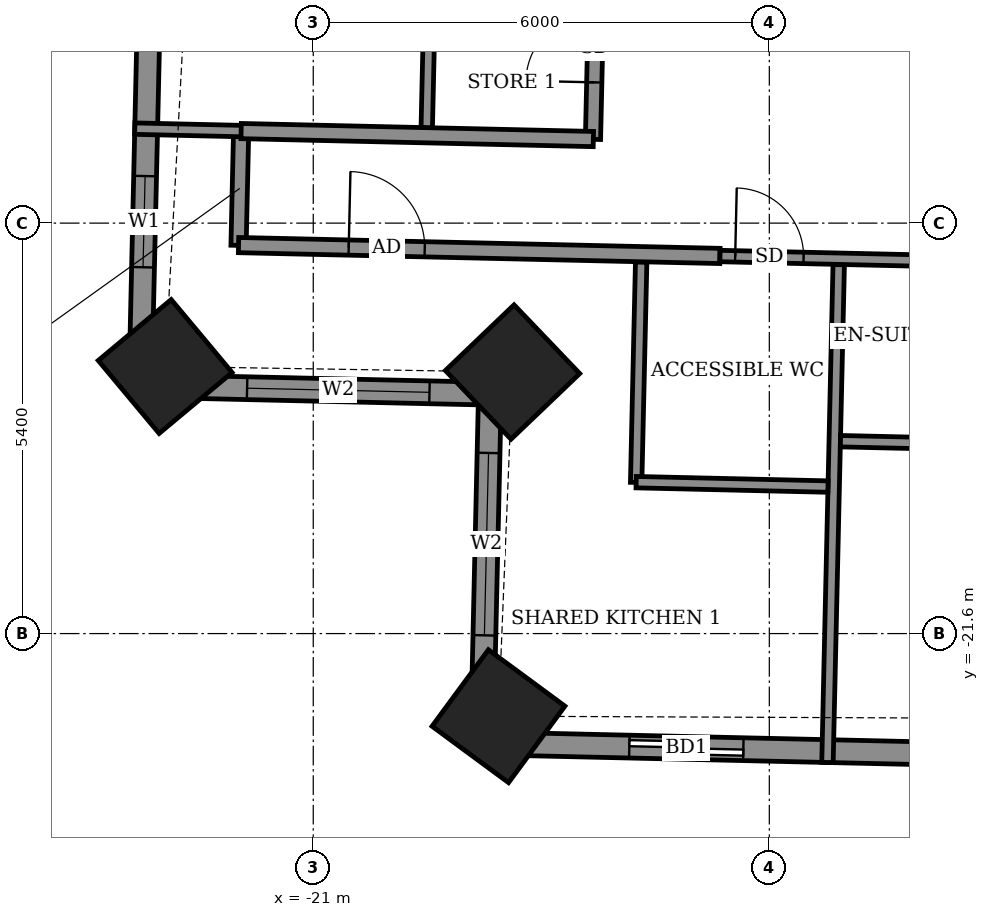
"""IFC4 building model, lengths in metres.
Left out: names, types, materials, properties, quantities, classifications, styles, units other than length and angle.
Written with IfcOpenShell. Run it as: python <this file> out.ifc"""

import sys

from ifc_helpers import new_model, si_unit, direction, frame, frame_2d, origin, origin_2d, place, context, subcontext, project, spatial, rectangle, extrude, element, fill, save


model = new_model("IFC4")
c1 = context("Model", 3, precision=1e-05, world=origin(), true_north=direction((0.0, 1.0)))
c2 = subcontext(c1, "Body", "Model", "MODEL_VIEW")
j1 = project(units=[si_unit("LENGTHUNIT", "METRE"), si_unit("PLANEANGLEUNIT", "RADIAN")], contexts=[c1])
p1 = place(None, origin())
s1 = spatial("IfcSite", under=j1, at=p1, CompositionType="ELEMENT")
p2 = place(p1, origin())
s2 = spatial("IfcBuilding", under=s1, at=p2, CompositionType="ELEMENT")
p3 = place(p2, frame((0.0, 0.0, 156.3)))
s3 = spatial("IfcBuildingStorey", under=s2, at=p3, CompositionType="ELEMENT", Elevation=156.3)
for number, where, z_axis, x_axis in (
    (1, (-22.948, -18.086, -0.55), (0.0, 0.0, 1.0), (0.641, -0.768, 0.0)),
    (2, (-18.378, -18.159, -0.55), (0.0, 0.0, 1.0), (0.691, -0.723, 0.0)),
    (3, (-18.563, -22.687, -0.55), (0.0, 0.0, 1.0), (0.805, -0.593, 0.0)),
):
    element("IfcColumn", number, at=place(p3, frame(where, z_axis=z_axis, x_axis=x_axis)), inside=s3, PredefinedType="COLUMN", context=c2, shape_type="SweptSolid", body=[
        extrude(rectangle(XDim=1.25, YDim=1.25, at=origin_2d()), origin(), (0.0, 0.0, 1.0), 3.6),
    ])
p4 = place(p3, frame((-23.038, -7.913, 0.0), z_axis=(0.0, 0.0, 1.0), x_axis=(-0.022705985163, -0.999742185885, 0.0)))
e4 = element("IfcWall", 4, at=p4, inside=s3, PredefinedType="SOLIDWALL", context=c2, shape_type="SweptSolid", body=[
    extrude(rectangle(XDim=10.43, YDim=0.3, at=frame_2d((5.215, 0.0))), origin(), (0.0, 0.0, 1.0), 3.05),
])
p5 = place(p4, frame((1.936, 0.0, 0.0)))
e5 = element("IfcOpeningElement", 5, at=p5, cuts=e4, PredefinedType="OPENING", context=c2, shape_type="SweptSolid", body=[
    extrude(rectangle(XDim=1.5, YDim=2.4, at=frame_2d((0.75, 1.2))), frame((0.0, 0.16, 0.0), z_axis=(0.0, -1.0, 0.0), x_axis=(1.0, 0.0, 0.0)), (0.0, 0.0, 1.0), 0.32),
])
p6 = place(p4, frame((7.67, 0.0, 0.9)))
e6 = element("IfcOpeningElement", 6, at=p6, cuts=e4, PredefinedType="OPENING", context=c2, shape_type="SweptSolid", body=[
    extrude(rectangle(XDim=1.2, YDim=1.5, at=frame_2d((0.6, 0.75))), frame((0.0, 0.16, 0.0), z_axis=(0.0, -1.0, 0.0), x_axis=(1.0, 0.0, 0.0)), (0.0, 0.0, 1.0), 0.32),
])
p7 = place(p3, frame((-23.275, -18.34, 0.0), z_axis=(0.0, 0.0, 1.0), x_axis=(0.999744377441, -0.022609285172, 0.0)))
e7 = element("IfcWall", 7, at=p7, inside=s3, PredefinedType="SOLIDWALL", context=c2, shape_type="SweptSolid", body=[
    extrude(rectangle(XDim=4.6, YDim=0.3, at=frame_2d((2.3, 0.0))), origin(), (0.0, 0.0, 1.0), 2.55),
])
p8 = place(p7, frame((1.405, 0.0, 0.9)))
e8 = element("IfcOpeningElement", 8, at=p8, cuts=e7, PredefinedType="OPENING", context=c2, shape_type="SweptSolid", body=[
    extrude(rectangle(XDim=2.4, YDim=1.5, at=frame_2d((1.2, 0.75))), frame((0.0, 0.16, 0.0), z_axis=(0.0, -1.0, 0.0), x_axis=(1.0, 0.0, 0.0)), (0.0, 0.0, 1.0), 0.32),
])
p9 = place(p3, frame((-18.676, -18.444, 0.0), z_axis=(0.0, 0.0, 1.0), x_axis=(-0.022821468877, -0.999739556364, 0.0)))
e9 = element("IfcWall", 9, at=p9, inside=s3, PredefinedType="SOLIDWALL", context=c2, shape_type="SweptSolid", body=[
    extrude(rectangle(XDim=4.6, YDim=0.3, at=frame_2d((2.3, 0.0))), origin(), (0.0, 0.0, 1.0), 2.55),
])
p10 = place(p9, frame((0.78, 0.0, 0.9)))
e10 = element("IfcOpeningElement", 10, at=p10, cuts=e9, PredefinedType="OPENING", context=c2, shape_type="SweptSolid", body=[
    extrude(rectangle(XDim=2.4, YDim=1.5, at=frame_2d((1.2, 0.75))), frame((0.0, 0.16, 0.0), z_axis=(0.0, -1.0, 0.0), x_axis=(1.0, 0.0, 0.0)), (0.0, 0.0, 1.0), 0.32),
])
p11 = place(p3, frame((-18.781, -23.043, 0.0), z_axis=(0.0, 0.0, 1.0), x_axis=(0.999742794992, -0.022679150367, 0.0)))
e11 = element("IfcWall", 11, at=p11, inside=s3, PredefinedType="SOLIDWALL", context=c2, shape_type="SweptSolid", body=[
    extrude(rectangle(XDim=38.98, YDim=0.3, at=frame_2d((19.49, 0.0))), origin(), (0.0, 0.0, 1.0), 3.05),
])
p12 = place(p11, frame((1.94, 0.0, 0.0)))
e12 = element("IfcOpeningElement", 12, at=p12, cuts=e11, PredefinedType="OPENING", context=c2, shape_type="SweptSolid", body=[
    extrude(rectangle(XDim=1.5, YDim=2.4, at=frame_2d((0.75, 1.2))), frame((0.0, 0.16, 0.0), z_axis=(0.0, -1.0, 0.0), x_axis=(1.0, 0.0, 0.0)), (0.0, 0.0, 1.0), 0.32),
])
p13 = place(p11, frame((7.211, 0.0, 0.0)))
e13 = element("IfcOpeningElement", 13, at=p13, cuts=e11, PredefinedType="OPENING", context=c2, shape_type="SweptSolid", body=[
    extrude(rectangle(XDim=1.2, YDim=2.4, at=frame_2d((0.6, 1.2))), frame((0.0, 0.16, 0.0), z_axis=(0.0, -1.0, 0.0), x_axis=(1.0, 0.0, 0.0)), (0.0, 0.0, 1.0), 0.32),
])
p14 = place(p11, frame((9.959, 0.0, 0.0)))
e14 = element("IfcOpeningElement", 14, at=p14, cuts=e11, PredefinedType="OPENING", context=c2, shape_type="SweptSolid", body=[
    extrude(rectangle(XDim=1.5, YDim=2.4, at=frame_2d((0.75, 1.2))), frame((0.0, 0.16, 0.0), z_axis=(0.0, -1.0, 0.0), x_axis=(1.0, 0.0, 0.0)), (0.0, 0.0, 1.0), 0.32),
])
p15 = place(p11, frame((14.659, 0.0, 0.0)))
e15 = element("IfcOpeningElement", 15, at=p15, cuts=e11, PredefinedType="OPENING", context=c2, shape_type="SweptSolid", body=[
    extrude(rectangle(XDim=1.5, YDim=2.4, at=frame_2d((0.75, 1.2))), frame((0.0, 0.16, 0.0), z_axis=(0.0, -1.0, 0.0), x_axis=(1.0, 0.0, 0.0)), (0.0, 0.0, 1.0), 0.32),
])
p16 = place(p11, frame((20.232, 0.0, 0.0)))
e16 = element("IfcOpeningElement", 16, at=p16, cuts=e11, PredefinedType="OPENING", context=c2, shape_type="SweptSolid", body=[
    extrude(rectangle(XDim=1.2, YDim=2.4, at=frame_2d((0.6, 1.2))), frame((0.0, 0.16, 0.0), z_axis=(0.0, -1.0, 0.0), x_axis=(1.0, 0.0, 0.0)), (0.0, 0.0, 1.0), 0.32),
])
p17 = place(p11, frame((22.981, 0.0, 0.0)))
e17 = element("IfcOpeningElement", 17, at=p17, cuts=e11, PredefinedType="OPENING", context=c2, shape_type="SweptSolid", body=[
    extrude(rectangle(XDim=1.5, YDim=2.4, at=frame_2d((0.75, 1.2))), frame((0.0, 0.16, 0.0), z_axis=(0.0, -1.0, 0.0), x_axis=(1.0, 0.0, 0.0)), (0.0, 0.0, 1.0), 0.32),
])
p18 = place(p11, frame((27.681, 0.0, 0.0)))
e18 = element("IfcOpeningElement", 18, at=p18, cuts=e11, PredefinedType="OPENING", context=c2, shape_type="SweptSolid", body=[
    extrude(rectangle(XDim=1.5, YDim=2.4, at=frame_2d((0.75, 1.2))), frame((0.0, 0.16, 0.0), z_axis=(0.0, -1.0, 0.0), x_axis=(1.0, 0.0, 0.0)), (0.0, 0.0, 1.0), 0.32),
])
p19 = place(p11, frame((30.654, 0.0, 0.0)))
e19 = element("IfcOpeningElement", 19, at=p19, cuts=e11, PredefinedType="OPENING", context=c2, shape_type="SweptSolid", body=[
    extrude(rectangle(XDim=1.2, YDim=2.4, at=frame_2d((0.6, 1.2))), frame((0.0, 0.16, 0.0), z_axis=(0.0, -1.0, 0.0), x_axis=(1.0, 0.0, 0.0)), (0.0, 0.0, 1.0), 0.32),
])
p20 = place(p11, frame((35.176, 0.0, 0.9)))
e20 = element("IfcOpeningElement", 20, at=p20, cuts=e11, PredefinedType="OPENING", context=c2, shape_type="SweptSolid", body=[
    extrude(rectangle(XDim=2.4, YDim=1.5, at=frame_2d((1.2, 0.75))), frame((0.0, 0.16, 0.0), z_axis=(0.0, -1.0, 0.0), x_axis=(1.0, 0.0, 0.0)), (0.0, 0.0, 1.0), 0.32),
])
p21 = place(p3, frame((-14.235, -23.296, 0.0), z_axis=(0.0, 0.0, 1.0), x_axis=(0.022623197363, 0.999744062719, 0.0)))
e21 = element("IfcWall", 21, at=p21, inside=s3, PredefinedType="PARTITIONING", context=c2, shape_type="SweptSolid", body=[
    extrude(rectangle(XDim=6.551, YDim=0.15, at=frame_2d((3.275, 0.0))), origin(), (0.0, 0.0, 1.0), 2.55),
])
p22 = place(p3, frame((-16.752, -19.612, 0.0), z_axis=(0.0, 0.0, 1.0), x_axis=(0.022730967319, 0.999741618182, 0.0)))
e22 = element("IfcWall", 22, at=p22, inside=s3, PredefinedType="PARTITIONING", context=c2, shape_type="SweptSolid", body=[
    extrude(rectangle(XDim=2.9, YDim=0.15, at=frame_2d((1.45, 0.0))), origin(), (0.0, 0.0, 1.0), 3.05),
])
p23 = place(p3, frame((-16.752, -19.608, 0.0), z_axis=(0.0, 0.0, 1.0), x_axis=(0.999735102249, -0.023015762656, 0.0)))
e23 = element("IfcWall", 23, at=p23, inside=s3, PredefinedType="PARTITIONING", context=c2, shape_type="SweptSolid", body=[
    extrude(rectangle(XDim=2.525, YDim=0.15, at=frame_2d((1.262, 0.0))), origin(), (0.0, 0.0, 1.0), 3.05),
])
p24 = place(p3, frame((-14.064, -19.069, 0.0), z_axis=(0.0, 0.0, 1.0), x_axis=(0.999740260747, -0.02279059109, 0.0)))
e24 = element("IfcWall", 24, at=p24, inside=s3, PredefinedType="PARTITIONING", context=c2, shape_type="SweptSolid", body=[
    extrude(rectangle(XDim=2.324, YDim=0.15, at=frame_2d((1.162, 0.0))), origin(), (0.0, 0.0, 1.0), 3.05),
])
p25 = place(p3, frame((-21.983, -16.493, 0.0), z_axis=(0.0, 0.0, 1.0), x_axis=(0.022617910375, 0.999744182344, 0.0)))
e25 = element("IfcWall", 25, at=p25, inside=s3, PredefinedType="PARTITIONING", context=c2, shape_type="SweptSolid", body=[
    extrude(rectangle(XDim=1.5, YDim=0.2, at=frame_2d((0.75, 0.0))), origin(), (0.0, 0.0, 1.0), 3.05),
])
p26 = place(p3, frame((-21.983, -16.489, 0.0), z_axis=(0.0, 0.0, 1.0), x_axis=(0.999744930163, -0.022584831499, 0.0)))
e26 = element("IfcWall", 26, at=p26, inside=s3, PredefinedType="PARTITIONING", context=c2, shape_type="SweptSolid", body=[
    extrude(rectangle(XDim=6.335, YDim=0.2, at=frame_2d((3.167, 0.0))), origin(), (0.0, 0.0, 1.0), 3.05),
])
p27 = place(p26, frame((1.45, 0.0, 0.0)))
e27 = element("IfcOpeningElement", 27, at=p27, cuts=e26, PredefinedType="OPENING", context=c2, shape_type="SweptSolid", body=[
    extrude(rectangle(XDim=1.0, YDim=2.1, at=frame_2d((0.5, 1.05))), frame((0.0, 0.11, 0.0), z_axis=(0.0, -1.0, 0.0), x_axis=(1.0, 0.0, 0.0)), (0.0, 0.0, 1.0), 0.22),
])
p28 = place(p3, frame((-15.649, -16.633, 0.0), z_axis=(0.0, 0.0, 1.0), x_axis=(0.999743261737, -0.022658565952, 0.0)))
e28 = element("IfcWall", 28, at=p28, inside=s3, PredefinedType="PARTITIONING", context=c2, shape_type="SweptSolid", body=[
    extrude(rectangle(XDim=30.536, YDim=0.15, at=frame_2d((15.268, 0.0))), origin(), (0.0, 0.0, 1.0), 3.05),
])
p29 = place(p28, frame((0.2, 0.0, 0.0)))
e29 = element("IfcOpeningElement", 29, at=p29, cuts=e28, PredefinedType="OPENING", context=c2, shape_type="SweptSolid", body=[
    extrude(rectangle(XDim=0.9, YDim=2.1, at=frame_2d((0.45, 1.05))), frame((0.0, 0.085, 0.0), z_axis=(0.0, -1.0, 0.0), x_axis=(1.0, 0.0, 0.0)), (0.0, 0.0, 1.0), 0.17),
])
p30 = place(p28, frame((4.465, 0.0, 0.0)))
e30 = element("IfcOpeningElement", 30, at=p30, cuts=e28, PredefinedType="OPENING", context=c2, shape_type="SweptSolid", body=[
    extrude(rectangle(XDim=0.9, YDim=2.1, at=frame_2d((0.45, 1.05))), frame((0.0, 0.085, 0.0), z_axis=(0.0, -1.0, 0.0), x_axis=(1.0, 0.0, 0.0)), (0.0, 0.0, 1.0), 0.17),
])
p31 = place(p28, frame((6.315, 0.0, 0.0)))
e31 = element("IfcOpeningElement", 31, at=p31, cuts=e28, PredefinedType="OPENING", context=c2, shape_type="SweptSolid", body=[
    extrude(rectangle(XDim=0.9, YDim=2.1, at=frame_2d((0.45, 1.05))), frame((0.0, 0.085, 0.0), z_axis=(0.0, -1.0, 0.0), x_axis=(1.0, 0.0, 0.0)), (0.0, 0.0, 1.0), 0.17),
])
p32 = place(p28, frame((13.04, 0.0, 0.0)))
e32 = element("IfcOpeningElement", 32, at=p32, cuts=e28, PredefinedType="OPENING", context=c2, shape_type="SweptSolid", body=[
    extrude(rectangle(XDim=0.9, YDim=2.1, at=frame_2d((0.45, 1.05))), frame((0.0, 0.085, 0.0), z_axis=(0.0, -1.0, 0.0), x_axis=(1.0, 0.0, 0.0)), (0.0, 0.0, 1.0), 0.17),
])
p33 = place(p28, frame((15.015, 0.0, 0.0)))
e33 = element("IfcOpeningElement", 33, at=p33, cuts=e28, PredefinedType="OPENING", context=c2, shape_type="SweptSolid", body=[
    extrude(rectangle(XDim=0.9, YDim=2.1, at=frame_2d((0.45, 1.05))), frame((0.0, 0.085, 0.0), z_axis=(0.0, -1.0, 0.0), x_axis=(1.0, 0.0, 0.0)), (0.0, 0.0, 1.0), 0.17),
])
p34 = place(p28, frame((21.74, 0.0, 0.0)))
e34 = element("IfcOpeningElement", 34, at=p34, cuts=e28, PredefinedType="OPENING", context=c2, shape_type="SweptSolid", body=[
    extrude(rectangle(XDim=0.9, YDim=2.1, at=frame_2d((0.45, 1.05))), frame((0.0, 0.085, 0.0), z_axis=(0.0, -1.0, 0.0), x_axis=(1.0, 0.0, 0.0)), (0.0, 0.0, 1.0), 0.17),
])
p35 = place(p28, frame((23.665, 0.0, 0.0)))
e35 = element("IfcOpeningElement", 35, at=p35, cuts=e28, PredefinedType="OPENING", context=c2, shape_type="SweptSolid", body=[
    extrude(rectangle(XDim=0.9, YDim=2.1, at=frame_2d((0.45, 1.05))), frame((0.0, 0.085, 0.0), z_axis=(0.0, -1.0, 0.0), x_axis=(1.0, 0.0, 0.0)), (0.0, 0.0, 1.0), 0.17),
])
p36 = place(p3, frame((-19.507, -14.949, 0.0), z_axis=(0.0, 0.0, 1.0), x_axis=(0.022603288534, 0.999744513037, 0.0)))
e36 = element("IfcWall", 36, at=p36, inside=s3, PredefinedType="PARTITIONING", context=c2, shape_type="SweptSolid", body=[
    extrude(rectangle(XDim=2.301, YDim=0.15, at=frame_2d((1.15, 0.0))), origin(), (0.0, 0.0, 1.0), 3.05),
])
p37 = place(p3, frame((-17.32, -15.098, 0.0), z_axis=(0.0, 0.0, 1.0), x_axis=(0.022694293906, 0.999742451346, 0.0)))
e37 = element("IfcWall", 37, at=p37, inside=s3, PredefinedType="PARTITIONING", context=c2, shape_type="SweptSolid", body=[
    extrude(rectangle(XDim=28.024, YDim=0.2, at=frame_2d((14.012, 0.0))), origin(), (0.0, 0.0, 1.0), 3.05),
])
p38 = place(p37, frame((24.212, 0.0, 0.0)))
e38 = element("IfcOpeningElement", 38, at=p38, cuts=e37, PredefinedType="OPENING", context=c2, shape_type="SweptSolid", body=[
    extrude(rectangle(XDim=1.0, YDim=2.1, at=frame_2d((0.5, 1.05))), frame((0.0, 0.11, 0.0), z_axis=(0.0, -1.0, 0.0), x_axis=(1.0, 0.0, 0.0)), (0.0, 0.0, 1.0), 0.22),
])
p39 = place(p37, frame((26.374, 0.0, 0.0)))
e39 = element("IfcOpeningElement", 39, at=p39, cuts=e37, PredefinedType="OPENING", context=c2, shape_type="SweptSolid", body=[
    extrude(rectangle(XDim=0.9, YDim=2.1, at=frame_2d((0.45, 1.05))), frame((0.0, 0.11, 0.0), z_axis=(0.0, -1.0, 0.0), x_axis=(1.0, 0.0, 0.0)), (0.0, 0.0, 1.0), 0.22),
])
p40 = place(p37, frame((21.774, 0.0, 0.0)))
e40 = element("IfcOpeningElement", 40, at=p40, cuts=e37, PredefinedType="OPENING", context=c2, shape_type="SweptSolid", body=[
    extrude(rectangle(XDim=1.0, YDim=2.1, at=frame_2d((0.5, 1.05))), frame((0.0, 0.11, 0.0), z_axis=(0.0, -1.0, 0.0), x_axis=(1.0, 0.0, 0.0)), (0.0, 0.0, 1.0), 0.22),
])
p41 = place(p37, frame((18.65, 0.0, 0.0)))
e41 = element("IfcOpeningElement", 41, at=p41, cuts=e37, PredefinedType="OPENING", context=c2, shape_type="SweptSolid", body=[
    extrude(rectangle(XDim=1.0, YDim=2.1, at=frame_2d((0.5, 1.05))), frame((0.0, 0.11, 0.0), z_axis=(0.0, -1.0, 0.0), x_axis=(1.0, 0.0, 0.0)), (0.0, 0.0, 1.0), 0.22),
])
p42 = place(p37, frame((15.626, 0.0, 0.0)))
e42 = element("IfcOpeningElement", 42, at=p42, cuts=e37, PredefinedType="OPENING", context=c2, shape_type="SweptSolid", body=[
    extrude(rectangle(XDim=1.0, YDim=2.1, at=frame_2d((0.5, 1.05))), frame((0.0, 0.11, 0.0), z_axis=(0.0, -1.0, 0.0), x_axis=(1.0, 0.0, 0.0)), (0.0, 0.0, 1.0), 0.22),
])
p43 = place(p37, frame((12.557, 0.0, 0.0)))
e43 = element("IfcOpeningElement", 43, at=p43, cuts=e37, PredefinedType="OPENING", context=c2, shape_type="SweptSolid", body=[
    extrude(rectangle(XDim=1.0, YDim=2.1, at=frame_2d((0.5, 1.05))), frame((0.0, 0.11, 0.0), z_axis=(0.0, -1.0, 0.0), x_axis=(1.0, 0.0, 0.0)), (0.0, 0.0, 1.0), 0.22),
])
p44 = place(p37, frame((10.049, 0.0, 0.0)))
e44 = element("IfcOpeningElement", 44, at=p44, cuts=e37, PredefinedType="OPENING", context=c2, shape_type="SweptSolid", body=[
    extrude(rectangle(XDim=1.0, YDim=2.1, at=frame_2d((0.5, 1.05))), frame((0.0, 0.11, 0.0), z_axis=(0.0, -1.0, 0.0), x_axis=(1.0, 0.0, 0.0)), (0.0, 0.0, 1.0), 0.22),
])
p45 = place(p37, frame((7.849, 0.0, 0.0)))
e45 = element("IfcOpeningElement", 45, at=p45, cuts=e37, PredefinedType="OPENING", context=c2, shape_type="SweptSolid", body=[
    extrude(rectangle(XDim=0.9, YDim=2.1, at=frame_2d((0.45, 1.05))), frame((0.0, 0.11, 0.0), z_axis=(0.0, -1.0, 0.0), x_axis=(1.0, 0.0, 0.0)), (0.0, 0.0, 1.0), 0.22),
])
p46 = place(p37, frame((4.199, 0.0, 0.0)))
e46 = element("IfcOpeningElement", 46, at=p46, cuts=e37, PredefinedType="OPENING", context=c2, shape_type="SweptSolid", body=[
    extrude(rectangle(XDim=1.0, YDim=2.1, at=frame_2d((0.5, 1.05))), frame((0.0, 0.11, 0.0), z_axis=(0.0, -1.0, 0.0), x_axis=(1.0, 0.0, 0.0)), (0.0, 0.0, 1.0), 0.22),
])
p47 = place(p37, frame((0.75, 0.0, 0.0)))
e47 = element("IfcOpeningElement", 47, at=p47, cuts=e37, PredefinedType="OPENING", context=c2, shape_type="SweptSolid", body=[
    extrude(rectangle(XDim=0.9, YDim=2.1, at=frame_2d((0.45, 1.05))), frame((0.0, 0.11, 0.0), z_axis=(0.0, -1.0, 0.0), x_axis=(1.0, 0.0, 0.0)), (0.0, 0.0, 1.0), 0.22),
])
p48 = place(p3, frame((-23.348, -14.957, 0.0), z_axis=(0.0, 0.0, 1.0), x_axis=(0.999740216184, -0.022792545827, 0.0)))
e48 = element("IfcWall", 48, at=p48, inside=s3, PredefinedType="PARTITIONING", context=c2, shape_type="SweptSolid", body=[
    extrude(rectangle(XDim=1.403, YDim=0.15, at=frame_2d((0.702, 0.0))), origin(), (0.0, 0.0, 1.0), 2.55),
])
p49 = place(p3, frame((-21.949, -14.989, 0.0), z_axis=(0.0, 0.0, 1.0), x_axis=(0.999743491588, -0.022648422179, 0.0)))
e49 = element("IfcWall", 49, at=p49, inside=s3, PredefinedType="PARTITIONING", context=c2, shape_type="SweptSolid", body=[
    extrude(rectangle(XDim=4.635, YDim=0.2, at=frame_2d((2.318, 0.0))), origin(), (0.0, 0.0, 1.0), 3.05),
])
p50 = place(p6, origin())
e50 = element("IfcWindow", 50, at=p50, inside=s3, PartitioningType="SINGLE_PANEL", PredefinedType="WINDOW", context=c2, shape_type="SweptSolid", body=[
    extrude(rectangle(XDim=1.2, YDim=1.5, at=frame_2d((0.6, 0.75))), frame((0.0, 0.03, 0.0), z_axis=(0.0, -1.0, 0.0), x_axis=(1.0, 0.0, 0.0)), (0.0, 0.0, 1.0), 0.06),
])
fill(e6, e50)
p51 = place(p8, origin())
e51 = element("IfcWindow", 51, at=p51, inside=s3, PartitioningType="DOUBLE_PANEL_VERTICAL", PredefinedType="WINDOW", context=c2, shape_type="SweptSolid", body=[
    extrude(rectangle(XDim=2.4, YDim=1.5, at=frame_2d((1.2, 0.75))), frame((0.0, 0.03, 0.0), z_axis=(0.0, -1.0, 0.0), x_axis=(1.0, 0.0, 0.0)), (0.0, 0.0, 1.0), 0.06),
])
fill(e8, e51)
p52 = place(p10, origin())
e52 = element("IfcWindow", 52, at=p52, inside=s3, PartitioningType="DOUBLE_PANEL_VERTICAL", PredefinedType="WINDOW", context=c2, shape_type="SweptSolid", body=[
    extrude(rectangle(XDim=2.4, YDim=1.5, at=frame_2d((1.2, 0.75))), frame((0.0, 0.03, 0.0), z_axis=(0.0, -1.0, 0.0), x_axis=(1.0, 0.0, 0.0)), (0.0, 0.0, 1.0), 0.06),
])
fill(e10, e52)
p53 = place(p12, origin())
e53 = element("IfcDoor", 53, at=p53, inside=s3, OperationType="SLIDING_TO_LEFT", PredefinedType="DOOR", context=c2, shape_type="SweptSolid", body=[
    extrude(rectangle(XDim=1.5, YDim=2.4, at=frame_2d((0.75, 1.2))), frame((0.0, 0.025, 0.0), z_axis=(0.0, -1.0, 0.0), x_axis=(1.0, 0.0, 0.0)), (0.0, 0.0, 1.0), 0.05),
])
fill(e12, e53)
p54 = place(p27, origin())
e54 = element("IfcDoor", 54, at=p54, inside=s3, OperationType="SINGLE_SWING_LEFT", PredefinedType="DOOR", context=c2, shape_type="SweptSolid", body=[
    extrude(rectangle(XDim=1.0, YDim=2.1, at=frame_2d((0.5, 1.05))), frame((0.0, 0.025, 0.0), z_axis=(0.0, -1.0, 0.0), x_axis=(1.0, 0.0, 0.0)), (0.0, 0.0, 1.0), 0.05),
])
fill(e27, e54)
p55 = place(p29, origin())
e55 = element("IfcDoor", 55, at=p55, inside=s3, OperationType="SINGLE_SWING_LEFT", PredefinedType="DOOR", context=c2, shape_type="SweptSolid", body=[
    extrude(rectangle(XDim=0.9, YDim=2.1, at=frame_2d((0.45, 1.05))), frame((0.0, 0.025, 0.0), z_axis=(0.0, -1.0, 0.0), x_axis=(1.0, 0.0, 0.0)), (0.0, 0.0, 1.0), 0.05),
])
fill(e29, e55)
p56 = place(p47, origin())
e56 = element("IfcDoor", 56, at=p56, inside=s3, OperationType="SINGLE_SWING_LEFT", PredefinedType="DOOR", context=c2, shape_type="SweptSolid", body=[
    extrude(rectangle(XDim=0.9, YDim=2.1, at=frame_2d((0.45, 1.05))), frame((0.0, 0.025, 0.0), z_axis=(0.0, -1.0, 0.0), x_axis=(1.0, 0.0, 0.0)), (0.0, 0.0, 1.0), 0.05),
])
fill(e47, e56)
save(model, sys.argv[1])
